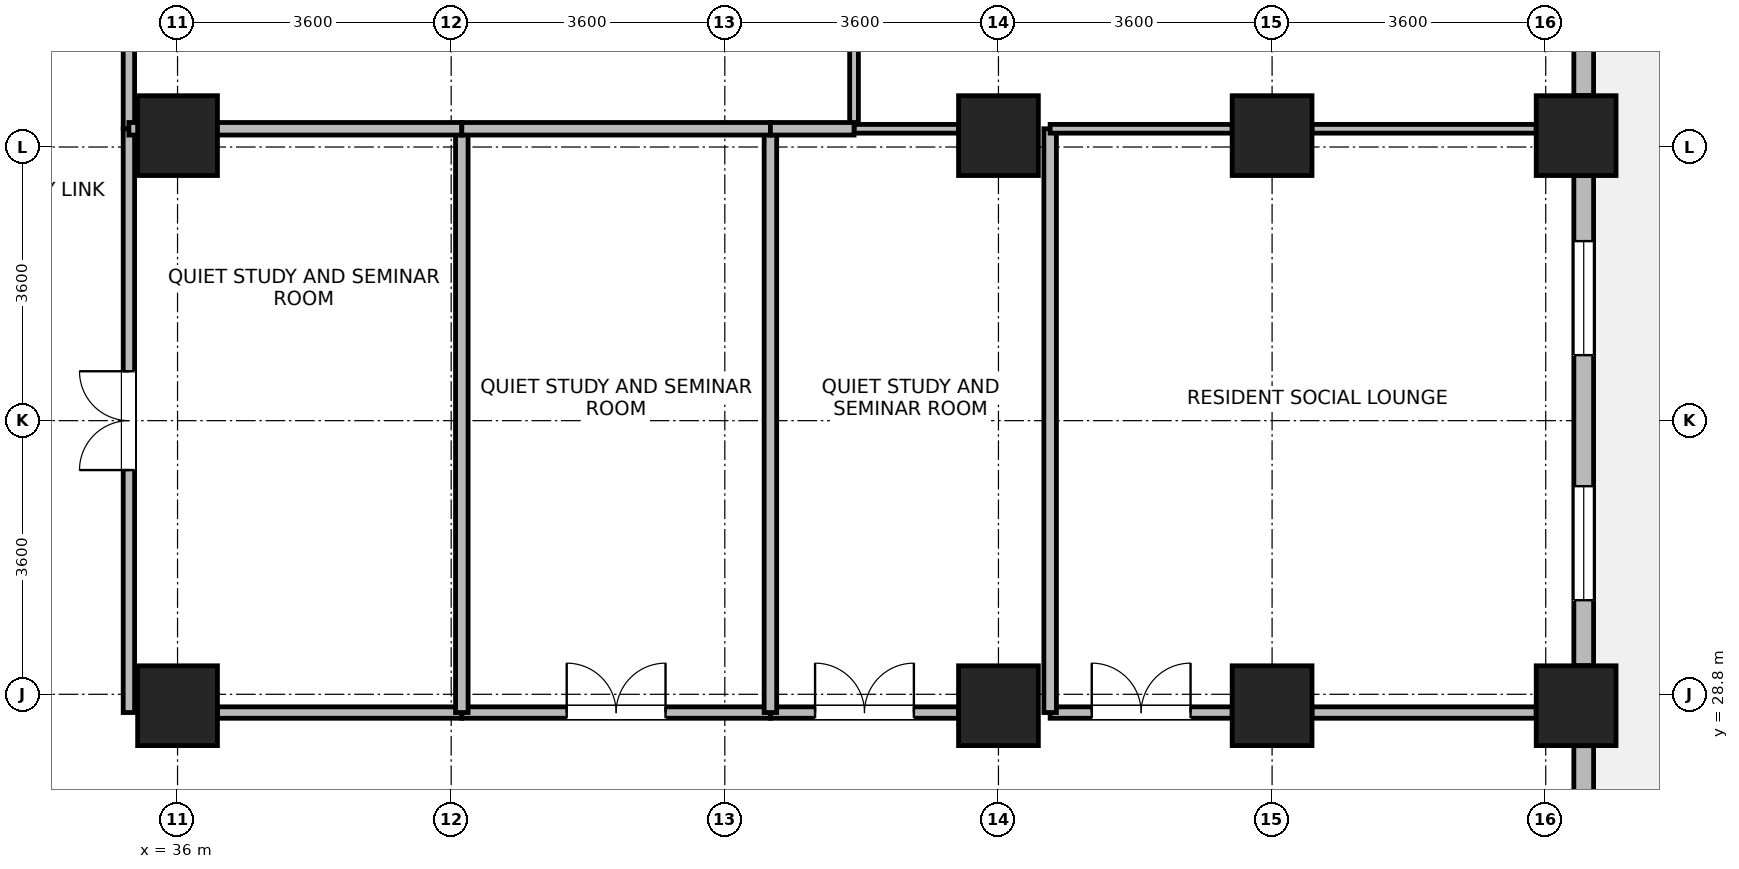
"""IFC4 building model, lengths in metres.
Left out: names, types, materials, properties, quantities, classifications, styles, units other than length and angle.
Written with IfcOpenShell. Run it as: python <this file> out.ifc"""

import sys

from ifc_helpers import new_model, si_unit, direction, frame, frame_2d, origin, origin_2d, place, context, subcontext, project, spatial, rectangle, extrude, source, transform, mapped, element, fill, save


model = new_model("IFC4")
c1 = context("Model", 3, precision=1e-05, world=origin(), true_north=direction((0.0, 1.0)))
c2 = subcontext(c1, "Body", "Model", "MODEL_VIEW")
j1 = project(units=[si_unit("LENGTHUNIT", "METRE"), si_unit("PLANEANGLEUNIT", "RADIAN")], contexts=[c1])
p1 = place(None, origin())
s1 = spatial("IfcSite", under=j1, at=p1, CompositionType="ELEMENT")
p2 = place(p1, origin())
s2 = spatial("IfcBuilding", under=s1, at=p2, CompositionType="ELEMENT")
p3 = place(p2, frame((0.0, 0.0, 169.8)))
s3 = spatial("IfcBuildingStorey", under=s2, at=p3, CompositionType="ELEMENT", Elevation=169.8)
m1 = source(origin(), c2, "Body", "SweptSolid", [
    extrude(rectangle(XDim=1.05, YDim=1.05, at=origin_2d()), origin(), (0.0, 0.0, 1.0), 3.7),
])
for number, where, z_axis, x_axis in (
    (1, (36.0, 28.65, 0.0), (0.0, 0.0, 1.0), (1.0, 0.0, 0.0)),
    (2, (36.0, 36.15, 0.0), (0.0, 0.0, 1.0), (1.0, 0.0, 0.0)),
    (3, (46.8, 28.65, 0.0), (0.0, 0.0, 1.0), (1.0, 0.0, 0.0)),
    (4, (46.8, 36.15, 0.0), (0.0, 0.0, 1.0), (1.0, 0.0, 0.0)),
    (5, (50.4, 28.65, 0.0), (0.0, 0.0, 1.0), (1.0, 0.0, 0.0)),
    (6, (50.4, 36.15, 0.0), (0.0, 0.0, 1.0), (1.0, 0.0, 0.0)),
    (7, (54.4, 28.65, 0.0), (0.0, 0.0, 1.0), (1.0, 0.0, 0.0)),
    (8, (54.4, 36.15, 0.0), (0.0, 0.0, 1.0), (1.0, 0.0, 0.0)),
):
    element("IfcColumn", number, at=place(p3, frame(where, z_axis=z_axis, x_axis=x_axis)), inside=s3, PredefinedType="COLUMN", context=c2, shape_type="MappedRepresentation", body=[
        mapped(m1, transform((0.0, 0.0, 0.0), x_axis=(1.0, 0.0, 0.0), y_axis=(0.0, 1.0, 0.0), z_axis=(0.0, 0.0, 1.0), scale=1.0)),
    ])
p4 = place(p3, frame((54.5, 28.124, 0.0), z_axis=(0.0, 0.0, 1.0), x_axis=(0.0, -1.0, 0.0)))
e9 = element("IfcWall", 9, at=p4, inside=s3, PredefinedType="STANDARD", context=c2, shape_type="SweptSolid", body=[
    extrude(rectangle(XDim=5.998, YDim=0.26, at=frame_2d((2.999, 0.0))), origin(), (0.0, 0.0, 1.0), 2.99),
])
p5 = place(p4, frame((3.749, 0.0, 0.85)))
e10 = element("IfcOpeningElement", 10, at=p5, cuts=e9, PredefinedType="OPENING", context=c2, shape_type="SweptSolid", body=[
    extrude(rectangle(XDim=1.5, YDim=1.85, at=frame_2d((0.75, 0.925))), frame((0.0, 0.14, 0.0), z_axis=(0.0, -1.0, 0.0), x_axis=(1.0, 0.0, 0.0)), (0.0, 0.0, 1.0), 0.28),
])
p6 = place(p4, frame((2.044, 0.0, 0.85)))
e11 = element("IfcOpeningElement", 11, at=p6, cuts=e9, PredefinedType="OPENING", context=c2, shape_type="SweptSolid", body=[
    extrude(rectangle(XDim=0.95, YDim=1.75, at=frame_2d((0.475, 0.875))), frame((0.0, 0.14, 0.0), z_axis=(0.0, -1.0, 0.0), x_axis=(1.0, 0.0, 0.0)), (0.0, 0.0, 1.0), 0.28),
])
p7 = place(p3, frame((54.5, 35.624, 0.0), z_axis=(0.0, 0.0, 1.0), x_axis=(0.0, -1.0, 0.0)))
e12 = element("IfcWall", 12, at=p7, inside=s3, PredefinedType="STANDARD", context=c2, shape_type="SweptSolid", body=[
    extrude(rectangle(XDim=6.448, YDim=0.26, at=frame_2d((3.224, 0.0))), origin(), (0.0, 0.0, 1.0), 2.99),
])
p8 = place(p7, frame((0.862, 0.0, 0.85)))
e13 = element("IfcOpeningElement", 13, at=p8, cuts=e12, PredefinedType="OPENING", context=c2, shape_type="SweptSolid", body=[
    extrude(rectangle(XDim=1.5, YDim=1.85, at=frame_2d((0.75, 0.925))), frame((0.0, 0.14, 0.0), z_axis=(0.0, -1.0, 0.0), x_axis=(1.0, 0.0, 0.0)), (0.0, 0.0, 1.0), 0.28),
])
p9 = place(p7, frame((4.086, 0.0, 0.85)))
e14 = element("IfcOpeningElement", 14, at=p9, cuts=e12, PredefinedType="OPENING", context=c2, shape_type="SweptSolid", body=[
    extrude(rectangle(XDim=1.5, YDim=1.85, at=frame_2d((0.75, 0.925))), frame((0.0, 0.14, 0.0), z_axis=(0.0, -1.0, 0.0), x_axis=(1.0, 0.0, 0.0)), (0.0, 0.0, 1.0), 0.28),
])
p10 = place(p3, frame((54.5, 39.73, 0.0), z_axis=(0.0, 0.0, 1.0), x_axis=(0.0, -1.0, 0.0)))
e15 = element("IfcWall", 15, at=p10, inside=s3, PredefinedType="STANDARD", context=c2, shape_type="SweptSolid", body=[
    extrude(rectangle(XDim=3.054, YDim=0.26, at=frame_2d((1.527, 0.0))), origin(), (0.0, 0.0, 1.0), 3.44),
])
p11 = place(p10, frame((0.777, 0.0, 0.85)))
e16 = element("IfcOpeningElement", 16, at=p11, cuts=e15, PredefinedType="OPENING", context=c2, shape_type="SweptSolid", body=[
    extrude(rectangle(XDim=1.5, YDim=1.85, at=frame_2d((0.75, 0.925))), frame((0.0, 0.14, 0.0), z_axis=(0.0, -1.0, 0.0), x_axis=(1.0, 0.0, 0.0)), (0.0, 0.0, 1.0), 0.28),
])
p12 = place(p3, frame((35.36, 28.56, 0.0), z_axis=(0.0, 0.0, 1.0), x_axis=(0.0, 1.0, 0.0)))
e17 = element("IfcWall", 17, at=p12, inside=s3, PredefinedType="PARTITIONING", context=c2, shape_type="SweptSolid", body=[
    extrude(rectangle(XDim=7.68, YDim=0.15, at=frame_2d((3.84, 0.0))), origin(), (0.0, 0.0, 1.0), 3.44),
])
p13 = place(p12, frame((3.19, 0.0, 0.0)))
e18 = element("IfcOpeningElement", 18, at=p13, cuts=e17, PredefinedType="OPENING", context=c2, shape_type="SweptSolid", body=[
    extrude(rectangle(XDim=1.3, YDim=2.12, at=frame_2d((0.65, 1.06))), frame((0.0, 0.085, 0.0), z_axis=(0.0, -1.0, 0.0), x_axis=(1.0, 0.0, 0.0)), (0.0, 0.0, 1.0), 0.17),
])
p14 = place(p3, frame((47.48, 28.56, 0.0), z_axis=(0.0, 0.0, 1.0), x_axis=(1.0, 0.0, 0.0)))
e19 = element("IfcWall", 19, at=p14, inside=s3, PredefinedType="PARTITIONING", context=c2, shape_type="SweptSolid", body=[
    extrude(rectangle(XDim=2.395, YDim=0.15, at=frame_2d((1.198, 0.0))), origin(), (0.0, 0.0, 1.0), 2.84),
])
p15 = place(p14, frame((0.548, 0.0, 0.0)))
e20 = element("IfcOpeningElement", 20, at=p15, cuts=e19, PredefinedType="OPENING", context=c2, shape_type="SweptSolid", body=[
    extrude(rectangle(XDim=1.3, YDim=2.12, at=frame_2d((0.65, 1.06))), frame((0.0, 0.085, 0.0), z_axis=(0.0, -1.0, 0.0), x_axis=(1.0, 0.0, 0.0)), (0.0, 0.0, 1.0), 0.17),
])
p16 = place(p3, frame((50.925, 28.56, 0.0), z_axis=(0.0, 0.0, 1.0), x_axis=(1.0, 0.0, 0.0)))
e21 = element("IfcWall", 21, at=p16, inside=s3, PredefinedType="PARTITIONING", context=c2, shape_type="SweptSolid", body=[
    extrude(rectangle(XDim=2.95, YDim=0.15, at=frame_2d((1.475, 0.0))), origin(), (0.0, 0.0, 1.0), 2.84),
])
p17 = place(p3, frame((36.525, 28.56, 0.0), z_axis=(0.0, 0.0, 1.0), x_axis=(1.0, 0.0, 0.0)))
e22 = element("IfcWall", 22, at=p17, inside=s3, PredefinedType="PARTITIONING", context=c2, shape_type="SweptSolid", body=[
    extrude(rectangle(XDim=3.215, YDim=0.15, at=frame_2d((1.607, 0.0))), origin(), (0.0, 0.0, 1.0), 2.84),
])
p18 = place(p3, frame((39.74, 28.56, 0.0), z_axis=(0.0, 0.0, 1.0), x_axis=(1.0, 0.0, 0.0)))
e23 = element("IfcWall", 23, at=p18, inside=s3, PredefinedType="PARTITIONING", context=c2, shape_type="SweptSolid", body=[
    extrude(rectangle(XDim=4.06, YDim=0.15, at=frame_2d((2.03, 0.0))), origin(), (0.0, 0.0, 1.0), 2.84),
])
p19 = place(p18, frame((1.38, 0.0, 0.0)))
e24 = element("IfcOpeningElement", 24, at=p19, cuts=e23, PredefinedType="OPENING", context=c2, shape_type="SweptSolid", body=[
    extrude(rectangle(XDim=1.3, YDim=2.12, at=frame_2d((0.65, 1.06))), frame((0.0, 0.085, 0.0), z_axis=(0.0, -1.0, 0.0), x_axis=(1.0, 0.0, 0.0)), (0.0, 0.0, 1.0), 0.17),
])
p20 = place(p3, frame((43.8, 28.56, 0.0), z_axis=(0.0, 0.0, 1.0), x_axis=(1.0, 0.0, 0.0)))
e25 = element("IfcWall", 25, at=p20, inside=s3, PredefinedType="PARTITIONING", context=c2, shape_type="SweptSolid", body=[
    extrude(rectangle(XDim=2.475, YDim=0.15, at=frame_2d((1.237, 0.0))), origin(), (0.0, 0.0, 1.0), 2.84),
])
p21 = place(p20, frame((0.587, 0.0, 0.0)))
e26 = element("IfcOpeningElement", 26, at=p21, cuts=e25, PredefinedType="OPENING", context=c2, shape_type="SweptSolid", body=[
    extrude(rectangle(XDim=1.3, YDim=2.12, at=frame_2d((0.65, 1.06))), frame((0.0, 0.085, 0.0), z_axis=(0.0, -1.0, 0.0), x_axis=(1.0, 0.0, 0.0)), (0.0, 0.0, 1.0), 0.17),
])
p22 = place(p3, frame((35.36, 36.24, 0.0), z_axis=(0.0, 0.0, 1.0), x_axis=(0.0, 1.0, 0.0)))
e27 = element("IfcWall", 27, at=p22, inside=s3, PredefinedType="PARTITIONING", context=c2, shape_type="SweptSolid", body=[
    extrude(rectangle(XDim=1.96, YDim=0.15, at=frame_2d((0.98, 0.0))), origin(), (0.0, 0.0, 1.0), 3.44),
])
for number, where, z_axis, x_axis in (
    (28, (39.74, 28.56, 0.0), (0.0, 0.0, 1.0), (0.0, 1.0, 0.0)),
    (29, (43.8, 28.56, 0.0), (0.0, 0.0, 1.0), (0.0, 1.0, 0.0)),
    (30, (47.48, 28.56, 0.0), (0.0, 0.0, 1.0), (0.0, 1.0, 0.0)),
):
    element("IfcWall", number, at=place(p3, frame(where, z_axis=z_axis, x_axis=x_axis)), inside=s3, PredefinedType="PARTITIONING", context=c2, shape_type="SweptSolid", body=[
        extrude(rectangle(XDim=7.68, YDim=0.165, at=frame_2d((3.84, 0.0))), origin(), (0.0, 0.0, 1.0), 3.44),
    ])
p23 = place(p3, frame((47.48, 36.24, 0.0), z_axis=(0.0, 0.0, 1.0), x_axis=(1.0, 0.0, 0.0)))
e31 = element("IfcWall", 31, at=p23, inside=s3, PredefinedType="PARTITIONING", context=c2, shape_type="SweptSolid", body=[
    extrude(rectangle(XDim=2.395, YDim=0.115, at=frame_2d((1.198, 0.0))), origin(), (0.0, 0.0, 1.0), 2.84),
])
p24 = place(p3, frame((50.925, 36.24, 0.0), z_axis=(0.0, 0.0, 1.0), x_axis=(1.0, 0.0, 0.0)))
e32 = element("IfcWall", 32, at=p24, inside=s3, PredefinedType="PARTITIONING", context=c2, shape_type="SweptSolid", body=[
    extrude(rectangle(XDim=2.95, YDim=0.115, at=frame_2d((1.475, 0.0))), origin(), (0.0, 0.0, 1.0), 2.84),
])
p25 = place(p3, frame((44.9, 36.24, 0.0), z_axis=(0.0, 0.0, 1.0), x_axis=(0.0, 1.0, 0.0)))
e33 = element("IfcWall", 33, at=p25, inside=s3, PredefinedType="PARTITIONING", context=c2, shape_type="SweptSolid", body=[
    extrude(rectangle(XDim=3.228, YDim=0.115, at=frame_2d((1.614, 0.0))), origin(), (0.0, 0.0, 1.0), 3.44),
])
p26 = place(p3, frame((35.36, 36.24, 0.0), z_axis=(0.0, 0.0, 1.0), x_axis=(1.0, 0.0, 0.0)))
e34 = element("IfcWall", 34, at=p26, inside=s3, PredefinedType="PARTITIONING", context=c2, shape_type="SweptSolid", body=[
    extrude(rectangle(XDim=4.38, YDim=0.165, at=frame_2d((2.19, 0.0))), origin(), (0.0, 0.0, 1.0), 2.84),
])
p27 = place(p3, frame((39.74, 36.24, 0.0), z_axis=(0.0, 0.0, 1.0), x_axis=(1.0, 0.0, 0.0)))
e35 = element("IfcWall", 35, at=p27, inside=s3, PredefinedType="PARTITIONING", context=c2, shape_type="SweptSolid", body=[
    extrude(rectangle(XDim=4.06, YDim=0.165, at=frame_2d((2.03, 0.0))), origin(), (0.0, 0.0, 1.0), 2.84),
])
p28 = place(p3, frame((44.9, 36.24, 0.0), z_axis=(0.0, 0.0, 1.0), x_axis=(1.0, 0.0, 0.0)))
e36 = element("IfcWall", 36, at=p28, inside=s3, PredefinedType="PARTITIONING", context=c2, shape_type="SweptSolid", body=[
    extrude(rectangle(XDim=1.375, YDim=0.115, at=frame_2d((0.688, 0.0))), origin(), (0.0, 0.0, 1.0), 2.84),
])
p29 = place(p3, frame((43.8, 36.24, 0.0), z_axis=(0.0, 0.0, 1.0), x_axis=(1.0, 0.0, 0.0)))
e37 = element("IfcWall", 37, at=p29, inside=s3, PredefinedType="PARTITIONING", context=c2, shape_type="SweptSolid", body=[
    extrude(rectangle(XDim=1.1, YDim=0.165, at=frame_2d((0.55, 0.0))), origin(), (0.0, 0.0, 1.0), 2.84),
])
p30 = place(p8, origin())
e38 = element("IfcWindow", 38, at=p30, inside=s3, PartitioningType="SINGLE_PANEL", PredefinedType="WINDOW", context=c2, shape_type="SweptSolid", body=[
    extrude(rectangle(XDim=1.5, YDim=1.85, at=frame_2d((0.75, 0.925))), frame((0.0, 0.03, 0.0), z_axis=(0.0, -1.0, 0.0), x_axis=(1.0, 0.0, 0.0)), (0.0, 0.0, 1.0), 0.06),
])
fill(e13, e38)
p31 = place(p9, origin())
e39 = element("IfcWindow", 39, at=p31, inside=s3, PartitioningType="SINGLE_PANEL", PredefinedType="WINDOW", context=c2, shape_type="SweptSolid", body=[
    extrude(rectangle(XDim=1.5, YDim=1.85, at=frame_2d((0.75, 0.925))), frame((0.0, 0.03, 0.0), z_axis=(0.0, -1.0, 0.0), x_axis=(1.0, 0.0, 0.0)), (0.0, 0.0, 1.0), 0.06),
])
fill(e14, e39)
p32 = place(p13, origin())
e40 = element("IfcDoor", 40, at=p32, inside=s3, OperationType="DOUBLE_DOOR_SINGLE_SWING", PredefinedType="DOOR", context=c2, shape_type="SweptSolid", body=[
    extrude(rectangle(XDim=1.3, YDim=2.12, at=frame_2d((0.65, 1.06))), frame((0.0, 0.025, 0.0), z_axis=(0.0, -1.0, 0.0), x_axis=(1.0, 0.0, 0.0)), (0.0, 0.0, 1.0), 0.05),
])
fill(e18, e40)
p33 = place(p15, origin())
e41 = element("IfcDoor", 41, at=p33, inside=s3, OperationType="DOUBLE_DOOR_SINGLE_SWING", PredefinedType="DOOR", context=c2, shape_type="SweptSolid", body=[
    extrude(rectangle(XDim=1.3, YDim=2.12, at=frame_2d((0.65, 1.06))), frame((0.0, 0.025, 0.0), z_axis=(0.0, -1.0, 0.0), x_axis=(1.0, 0.0, 0.0)), (0.0, 0.0, 1.0), 0.05),
])
fill(e20, e41)
p34 = place(p19, origin())
e42 = element("IfcDoor", 42, at=p34, inside=s3, OperationType="DOUBLE_DOOR_SINGLE_SWING", PredefinedType="DOOR", context=c2, shape_type="SweptSolid", body=[
    extrude(rectangle(XDim=1.3, YDim=2.12, at=frame_2d((0.65, 1.06))), frame((0.0, 0.025, 0.0), z_axis=(0.0, -1.0, 0.0), x_axis=(1.0, 0.0, 0.0)), (0.0, 0.0, 1.0), 0.05),
])
fill(e24, e42)
p35 = place(p21, origin())
e43 = element("IfcDoor", 43, at=p35, inside=s3, OperationType="DOUBLE_DOOR_SINGLE_SWING", PredefinedType="DOOR", context=c2, shape_type="SweptSolid", body=[
    extrude(rectangle(XDim=1.3, YDim=2.12, at=frame_2d((0.65, 1.06))), frame((0.0, 0.025, 0.0), z_axis=(0.0, -1.0, 0.0), x_axis=(1.0, 0.0, 0.0)), (0.0, 0.0, 1.0), 0.05),
])
fill(e26, e43)
save(model, sys.argv[1])
